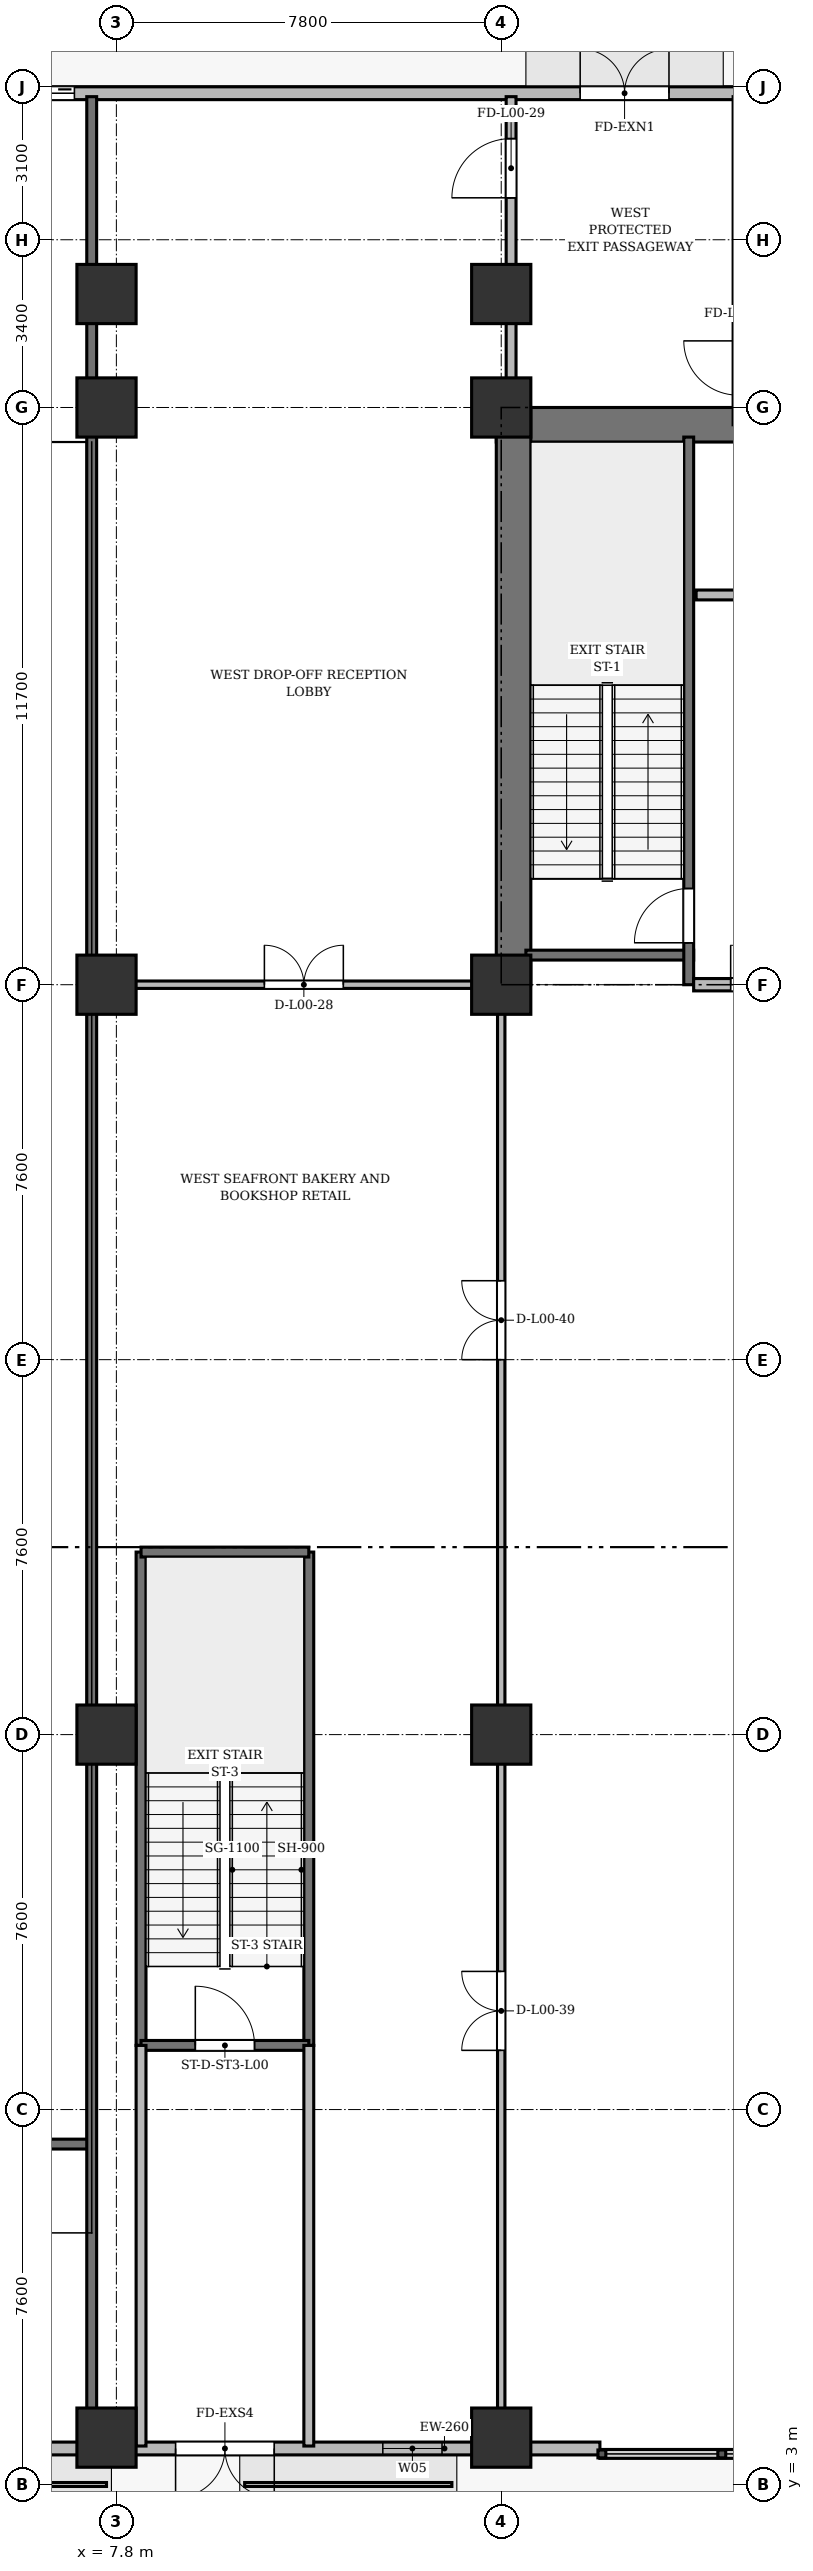
"""IFC4 building model, lengths in metres.
Left out: names, types, materials, properties, quantities, classifications, styles, units other than length and angle.
Written with IfcOpenShell. Run it as: python <this file> out.ifc"""

import sys

from ifc_helpers import new_model, si_unit, direction, frame, frame_2d, origin, origin_2d, place, context, subcontext, project, spatial, rectangle, extrude, source, transform, mapped, element, fill, save


model = new_model("IFC4")
c1 = context("Model", 3, precision=1e-05, world=origin(), true_north=direction((0.0, 1.0)))
c2 = subcontext(c1, "Body", "Model", "MODEL_VIEW")
j1 = project(units=[si_unit("LENGTHUNIT", "METRE"), si_unit("PLANEANGLEUNIT", "RADIAN")], contexts=[c1])
p1 = place(None, origin())
s1 = spatial("IfcSite", under=j1, at=p1, CompositionType="ELEMENT")
p2 = place(p1, origin())
s2 = spatial("IfcBuilding", under=s1, at=p2, CompositionType="ELEMENT")
p3 = place(p2, origin())
s3 = spatial("IfcBuildingStorey", under=s2, at=p3, CompositionType="ELEMENT", Elevation=0.0)
m1 = source(origin(), c2, "Body", "SweptSolid", [
    extrude(rectangle(XDim=1.2, YDim=1.2, at=origin_2d()), origin(), (0.0, 0.0, 1.0), 5.2),
])
for number, where, z_axis, x_axis in (
    (1, (7.6, 3.95, 0.0), (0.0, 0.0, 1.0), (1.0, 0.0, 0.0)),
    (2, (7.6, 18.2, 0.0), (0.0, 0.0, 1.0), (1.0, 0.0, 0.0)),
    (3, (7.6, 33.4, 0.0), (0.0, 0.0, 1.0), (1.0, 0.0, 0.0)),
    (4, (7.6, 45.1, 0.0), (0.0, 0.0, 1.0), (1.0, 0.0, 0.0)),
    (5, (7.6, 47.4, 0.0), (0.0, 0.0, 1.0), (1.0, 0.0, 0.0)),
    (6, (15.6, 3.95, 0.0), (0.0, 0.0, 1.0), (1.0, 0.0, 0.0)),
    (7, (15.6, 18.2, 0.0), (0.0, 0.0, 1.0), (1.0, 0.0, 0.0)),
    (8, (15.6, 33.4, 0.0), (0.0, 0.0, 1.0), (1.0, 0.0, 0.0)),
    (9, (15.6, 45.1, 0.0), (0.0, 0.0, 1.0), (1.0, 0.0, 0.0)),
    (10, (15.6, 47.4, 0.0), (0.0, 0.0, 1.0), (1.0, 0.0, 0.0)),
):
    element("IfcColumn", number, at=place(p3, frame(where, z_axis=z_axis, x_axis=x_axis)), inside=s3, PredefinedType="COLUMN", context=c2, shape_type="MappedRepresentation", body=[
        mapped(m1, transform((0.0, 0.0, 0.0), x_axis=(1.0, 0.0, 0.0), y_axis=(0.0, 1.0, 0.0), z_axis=(0.0, 0.0, 1.0), scale=1.0)),
    ])
p4 = place(p3, frame((-2.05, 51.47, 0.0), z_axis=(0.0, 0.0, 1.0), x_axis=(1.0, 0.0, 0.0)))
e11 = element("IfcWall", 11, at=p4, inside=s3, PredefinedType="SOLIDWALL", context=c2, shape_type="SweptSolid", body=[
    extrude(rectangle(XDim=78.5, YDim=0.26, at=frame_2d((39.25, 0.0))), origin(), (0.0, 0.0, 1.0), 4.88),
])
p5 = place(p4, frame((3.0, 0.0, 0.0)))
e12 = element("IfcOpeningElement", 12, at=p5, cuts=e11, PredefinedType="OPENING", context=c2, shape_type="SweptSolid", body=[
    extrude(rectangle(XDim=6.0, YDim=4.2, at=frame_2d((3.0, 2.1))), frame((0.0, 0.14, 0.0), z_axis=(0.0, -1.0, 0.0), x_axis=(1.0, 0.0, 0.0)), (0.0, 0.0, 1.0), 0.28),
])
p6 = place(p4, frame((19.25, 0.0, 0.0)))
e13 = element("IfcOpeningElement", 13, at=p6, cuts=e11, PredefinedType="OPENING", context=c2, shape_type="SweptSolid", body=[
    extrude(rectangle(XDim=1.8, YDim=2.3, at=frame_2d((0.9, 1.15))), frame((0.0, 0.14, 0.0), z_axis=(0.0, -1.0, 0.0), x_axis=(1.0, 0.0, 0.0)), (0.0, 0.0, 1.0), 0.28),
])
p7 = place(p4, frame((57.85, 0.0, 0.0)))
e14 = element("IfcOpeningElement", 14, at=p7, cuts=e11, PredefinedType="OPENING", context=c2, shape_type="SweptSolid", body=[
    extrude(rectangle(XDim=1.8, YDim=2.3, at=frame_2d((0.9, 1.15))), frame((0.0, 0.14, 0.0), z_axis=(0.0, -1.0, 0.0), x_axis=(1.0, 0.0, 0.0)), (0.0, 0.0, 1.0), 0.28),
])
p8 = place(p3, frame((17.6, 3.73, 0.0), z_axis=(0.0, 0.0, 1.0), x_axis=(-1.0, 0.0, 0.0)))
e15 = element("IfcWall", 15, at=p8, inside=s3, PredefinedType="SOLIDWALL", context=c2, shape_type="SweptSolid", body=[
    extrude(rectangle(XDim=19.65, YDim=0.26, at=frame_2d((9.825, 0.0))), origin(), (0.0, 0.0, 1.0), 3.78),
])
p9 = place(p8, frame((6.6, 0.0, 0.0)))
e16 = element("IfcOpeningElement", 16, at=p9, cuts=e15, PredefinedType="OPENING", context=c2, shape_type="SweptSolid", body=[
    extrude(rectangle(XDim=2.0, YDim=2.4, at=frame_2d((1.0, 1.2))), frame((0.0, 0.14, 0.0), z_axis=(0.0, -1.0, 0.0), x_axis=(1.0, 0.0, 0.0)), (0.0, 0.0, 1.0), 0.28),
])
p10 = place(p8, frame((12.4, 0.0, 0.0)))
e17 = element("IfcOpeningElement", 17, at=p10, cuts=e15, PredefinedType="OPENING", context=c2, shape_type="SweptSolid", body=[
    extrude(rectangle(XDim=2.0, YDim=2.4, at=frame_2d((1.0, 1.2))), frame((0.0, 0.14, 0.0), z_axis=(0.0, -1.0, 0.0), x_axis=(1.0, 0.0, 0.0)), (0.0, 0.0, 1.0), 0.28),
])
p11 = place(p8, frame((3.2, 0.0, 0.9)))
e18 = element("IfcOpeningElement", 18, at=p11, cuts=e15, PredefinedType="OPENING", context=c2, shape_type="SweptSolid", body=[
    extrude(rectangle(XDim=1.2, YDim=2.2, at=frame_2d((0.6, 1.1))), frame((0.0, 0.14, 0.0), z_axis=(0.0, -1.0, 0.0), x_axis=(1.0, 0.0, 0.0)), (0.0, 0.0, 1.0), 0.28),
])
p12 = place(p8, frame((15.2, 0.0, 0.9)))
e19 = element("IfcOpeningElement", 19, at=p12, cuts=e15, PredefinedType="OPENING", context=c2, shape_type="SweptSolid", body=[
    extrude(rectangle(XDim=1.2, YDim=2.2, at=frame_2d((0.6, 1.1))), frame((0.0, 0.14, 0.0), z_axis=(0.0, -1.0, 0.0), x_axis=(1.0, 0.0, 0.0)), (0.0, 0.0, 1.0), 0.28),
])
p13 = place(p3, frame((15.5, 44.75, 0.0), z_axis=(0.0, 0.0, 1.0), x_axis=(1.0, 0.0, 0.0)))
e20 = element("IfcWall", 20, at=p13, inside=s3, PredefinedType="SHEAR", context=c2, shape_type="SweptSolid", body=[
    extrude(rectangle(XDim=43.4, YDim=0.7, at=frame_2d((21.7, 0.0))), origin(), (0.0, 0.0, 1.0), 4.88),
])
p14 = place(p3, frame((15.85, 33.4, 0.0), z_axis=(0.0, 0.0, 1.0), x_axis=(0.0, 1.0, 0.0)))
e21 = element("IfcWall", 21, at=p14, inside=s3, PredefinedType="SHEAR", context=c2, shape_type="SweptSolid", body=[
    extrude(rectangle(XDim=11.7, YDim=0.7, at=frame_2d((5.85, 0.0))), origin(), (0.0, 0.0, 1.0), 4.88),
])
p15 = place(p3, frame((16.1, 34.0, 0.0), z_axis=(0.0, 0.0, 1.0), x_axis=(1.0, 0.0, 0.0)))
e22 = element("IfcWall", 22, at=p15, inside=s3, PredefinedType="SHEAR", context=c2, shape_type="SweptSolid", body=[
    extrude(rectangle(XDim=3.4, YDim=0.2, at=frame_2d((1.7, 0.0))), origin(), (0.0, 0.0, 1.0), 4.88),
])
p16 = place(p3, frame((19.4, 33.4, 0.0), z_axis=(0.0, 0.0, 1.0), x_axis=(0.0, 1.0, 0.0)))
e23 = element("IfcWall", 23, at=p16, inside=s3, PredefinedType="SHEAR", context=c2, shape_type="SweptSolid", body=[
    extrude(rectangle(XDim=11.1, YDim=0.2, at=frame_2d((5.55, 0.0))), origin(), (0.0, 0.0, 1.0), 4.88),
])
p17 = place(p16, frame((0.85, 0.0, 0.0)))
e24 = element("IfcOpeningElement", 24, at=p17, cuts=e23, PredefinedType="OPENING", context=c2, shape_type="SweptSolid", body=[
    extrude(rectangle(XDim=1.1, YDim=2.15, at=frame_2d((0.55, 1.075))), frame((0.0, 0.11, 0.0), z_axis=(0.0, -1.0, 0.0), x_axis=(1.0, 0.0, 0.0)), (0.0, 0.0, 1.0), 0.22),
])
for number, where, z_axis, x_axis in (
    (25, (8.3, 11.9, 0.0), (0.0, 0.0, 1.0), (0.0, 1.0, 0.0)),
    (26, (11.7, 11.9, 0.0), (0.0, 0.0, 1.0), (0.0, 1.0, 0.0)),
):
    element("IfcWall", number, at=place(p3, frame(where, z_axis=z_axis, x_axis=x_axis)), inside=s3, PredefinedType="SHEAR", context=c2, shape_type="SweptSolid", body=[
        extrude(rectangle(XDim=10.0, YDim=0.2, at=frame_2d((5.0, 0.0))), origin(), (0.0, 0.0, 1.0), 4.88),
    ])
p18 = place(p3, frame((8.3, 11.9, 0.0), z_axis=(0.0, 0.0, 1.0), x_axis=(1.0, 0.0, 0.0)))
e27 = element("IfcWall", 27, at=p18, inside=s3, PredefinedType="SHEAR", context=c2, shape_type="SweptSolid", body=[
    extrude(rectangle(XDim=3.4, YDim=0.2, at=frame_2d((1.7, 0.0))), origin(), (0.0, 0.0, 1.0), 4.88),
])
p19 = place(p18, frame((1.1, 0.0, 0.0)))
e28 = element("IfcOpeningElement", 28, at=p19, cuts=e27, PredefinedType="OPENING", context=c2, shape_type="SweptSolid", body=[
    extrude(rectangle(XDim=1.2, YDim=2.15, at=frame_2d((0.6, 1.075))), frame((0.0, 0.11, 0.0), z_axis=(0.0, -1.0, 0.0), x_axis=(1.0, 0.0, 0.0)), (0.0, 0.0, 1.0), 0.22),
])
p20 = place(p3, frame((8.3, 21.9, 0.0), z_axis=(0.0, 0.0, 1.0), x_axis=(1.0, 0.0, 0.0)))
e29 = element("IfcWall", 29, at=p20, inside=s3, PredefinedType="SHEAR", context=c2, shape_type="SweptSolid", body=[
    extrude(rectangle(XDim=3.4, YDim=0.2, at=frame_2d((1.7, 0.0))), origin(), (0.0, 0.0, 1.0), 4.88),
])
p21 = place(p3, frame((19.55, 41.3, 0.0), z_axis=(0.0, 0.0, 1.0), x_axis=(1.0, 0.0, 0.0)))
e30 = element("IfcWall", 30, at=p21, inside=s3, PredefinedType="SOLIDWALL", context=c2, shape_type="SweptSolid", body=[
    extrude(rectangle(XDim=6.75, YDim=0.2, at=frame_2d((3.375, 0.0))), origin(), (0.0, 0.0, 1.0), 4.88),
])
p22 = place(p21, frame((1.7, 0.0, 0.0)))
e31 = element("IfcOpeningElement", 31, at=p22, cuts=e30, PredefinedType="OPENING", context=c2, shape_type="SweptSolid", body=[
    extrude(rectangle(XDim=1.1, YDim=2.15, at=frame_2d((0.55, 1.075))), frame((0.0, 0.11, 0.0), z_axis=(0.0, -1.0, 0.0), x_axis=(1.0, 0.0, 0.0)), (0.0, 0.0, 1.0), 0.22),
])
p23 = place(p21, frame((4.4, 0.0, 0.0)))
e32 = element("IfcOpeningElement", 32, at=p23, cuts=e30, PredefinedType="OPENING", context=c2, shape_type="SweptSolid", body=[
    extrude(rectangle(XDim=1.1, YDim=2.15, at=frame_2d((0.55, 1.075))), frame((0.0, 0.11, 0.0), z_axis=(0.0, -1.0, 0.0), x_axis=(1.0, 0.0, 0.0)), (0.0, 0.0, 1.0), 0.22),
])
p24 = place(p3, frame((19.5, 33.4, 0.0), z_axis=(0.0, 0.0, 1.0), x_axis=(1.0, 0.0, 0.0)))
e33 = element("IfcWall", 33, at=p24, inside=s3, PredefinedType="PARTITIONING", context=c2, shape_type="SweptSolid", body=[
    extrude(rectangle(XDim=6.8, YDim=0.25, at=frame_2d((3.4, 0.0))), origin(), (0.0, 0.0, 1.0), 3.78),
])
p25 = place(p24, frame((0.75, 0.0, 0.0)))
e34 = element("IfcOpeningElement", 34, at=p25, cuts=e33, PredefinedType="OPENING", context=c2, shape_type="SweptSolid", body=[
    extrude(rectangle(XDim=1.6, YDim=2.2, at=frame_2d((0.8, 1.1))), frame((0.0, 0.135, 0.0), z_axis=(0.0, -1.0, 0.0), x_axis=(1.0, 0.0, 0.0)), (0.0, 0.0, 1.0), 0.27),
])
p26 = place(p3, frame((0.7, 9.9, 0.0), z_axis=(0.0, 0.0, 1.0), x_axis=(1.0, 0.0, 0.0)))
e35 = element("IfcWall", 35, at=p26, inside=s3, PredefinedType="SHEAR", context=c2, shape_type="SweptSolid", body=[
    extrude(rectangle(XDim=6.6, YDim=0.2, at=frame_2d((3.3, 0.0))), origin(), (0.0, 0.0, 1.0), 4.88),
])
p27 = place(p3, frame((7.3, 3.8, 0.0), z_axis=(0.0, 0.0, 1.0), x_axis=(0.0, 1.0, 0.0)))
e36 = element("IfcWall", 36, at=p27, inside=s3, PredefinedType="SHEAR", context=c2, shape_type="SweptSolid", body=[
    extrude(rectangle(XDim=47.6, YDim=0.2, at=frame_2d((23.8, 0.0))), origin(), (0.0, 0.0, 1.0), 4.88),
])
p28 = place(p3, frame((7.3, 33.4, 0.0), z_axis=(0.0, 0.0, 1.0), x_axis=(1.0, 0.0, 0.0)))
e37 = element("IfcWall", 37, at=p28, inside=s3, PredefinedType="PARTITIONING", context=c2, shape_type="SweptSolid", body=[
    extrude(rectangle(XDim=8.5, YDim=0.15, at=frame_2d((4.25, 0.0))), origin(), (0.0, 0.0, 1.0), 3.78),
])
p29 = place(p28, frame((3.5, 0.0, 0.0)))
e38 = element("IfcOpeningElement", 38, at=p29, cuts=e37, PredefinedType="OPENING", context=c2, shape_type="SweptSolid", body=[
    extrude(rectangle(XDim=1.6, YDim=2.2, at=frame_2d((0.8, 1.1))), frame((0.0, 0.085, 0.0), z_axis=(0.0, -1.0, 0.0), x_axis=(1.0, 0.0, 0.0)), (0.0, 0.0, 1.0), 0.17),
])
p30 = place(p3, frame((15.8, 44.75, 0.0), z_axis=(0.0, 0.0, 1.0), x_axis=(0.0, 1.0, 0.0)))
e39 = element("IfcWall", 39, at=p30, inside=s3, PredefinedType="PARTITIONING", context=c2, shape_type="SweptSolid", body=[
    extrude(rectangle(XDim=6.65, YDim=0.2, at=frame_2d((3.325, 0.0))), origin(), (0.0, 0.0, 1.0), 3.78),
])
p31 = place(p30, frame((4.6, 0.0, 0.0)))
e40 = element("IfcOpeningElement", 40, at=p31, cuts=e39, PredefinedType="OPENING", context=c2, shape_type="SweptSolid", body=[
    extrude(rectangle(XDim=1.2, YDim=2.15, at=frame_2d((0.6, 1.075))), frame((0.0, 0.11, 0.0), z_axis=(0.0, -1.0, 0.0), x_axis=(1.0, 0.0, 0.0)), (0.0, 0.0, 1.0), 0.22),
])
p32 = place(p3, frame((20.4, 44.75, 0.0), z_axis=(0.0, 0.0, 1.0), x_axis=(0.0, 1.0, 0.0)))
e41 = element("IfcWall", 41, at=p32, inside=s3, PredefinedType="PARTITIONING", context=c2, shape_type="SweptSolid", body=[
    extrude(rectangle(XDim=6.65, YDim=0.2, at=frame_2d((3.325, 0.0))), origin(), (0.0, 0.0, 1.0), 3.78),
])
p33 = place(p32, frame((0.6, 0.0, 0.0)))
e42 = element("IfcOpeningElement", 42, at=p33, cuts=e41, PredefinedType="OPENING", context=c2, shape_type="SweptSolid", body=[
    extrude(rectangle(XDim=1.1, YDim=2.15, at=frame_2d((0.55, 1.075))), frame((0.0, 0.11, 0.0), z_axis=(0.0, -1.0, 0.0), x_axis=(1.0, 0.0, 0.0)), (0.0, 0.0, 1.0), 0.22),
])
for number, where, z_axis, x_axis in (
    (43, (8.3, 3.78, 0.0), (0.0, 0.0, 1.0), (0.0, 1.0, 0.0)),
    (44, (11.7, 3.78, 0.0), (0.0, 0.0, 1.0), (0.0, 1.0, 0.0)),
):
    element("IfcWall", number, at=place(p3, frame(where, z_axis=z_axis, x_axis=x_axis)), inside=s3, PredefinedType="PARTITIONING", context=c2, shape_type="SweptSolid", body=[
        extrude(rectangle(XDim=8.12, YDim=0.2, at=frame_2d((4.06, 0.0))), origin(), (0.0, 0.0, 1.0), 3.78),
    ])
p34 = place(p3, frame((15.6, 3.8, 0.0), z_axis=(0.0, 0.0, 1.0), x_axis=(0.0, 1.0, 0.0)))
e45 = element("IfcWall", 45, at=p34, inside=s3, PredefinedType="PARTITIONING", context=c2, shape_type="SweptSolid", body=[
    extrude(rectangle(XDim=29.6, YDim=0.15, at=frame_2d((14.8, 0.0))), origin(), (0.0, 0.0, 1.0), 4.08),
])
p35 = place(p34, frame((8.0, 0.0, 0.0)))
e46 = element("IfcOpeningElement", 46, at=p35, cuts=e45, PredefinedType="OPENING", context=c2, shape_type="SweptSolid", body=[
    extrude(rectangle(XDim=1.6, YDim=2.2, at=frame_2d((0.8, 1.1))), frame((0.0, 0.085, 0.0), z_axis=(0.0, -1.0, 0.0), x_axis=(1.0, 0.0, 0.0)), (0.0, 0.0, 1.0), 0.17),
])
p36 = place(p34, frame((22.0, 0.0, 0.0)))
e47 = element("IfcOpeningElement", 47, at=p36, cuts=e45, PredefinedType="OPENING", context=c2, shape_type="SweptSolid", body=[
    extrude(rectangle(XDim=1.6, YDim=2.2, at=frame_2d((0.8, 1.1))), frame((0.0, 0.085, 0.0), z_axis=(0.0, -1.0, 0.0), x_axis=(1.0, 0.0, 0.0)), (0.0, 0.0, 1.0), 0.17),
])
m2 = source(origin(), c2, "Body", "SweptSolid", [
    extrude(rectangle(XDim=6.0, YDim=4.2, at=frame_2d((3.0, 2.1))), frame((0.0, 0.025, 0.0), z_axis=(0.0, -1.0, 0.0), x_axis=(1.0, 0.0, 0.0)), (0.0, 0.0, 1.0), 0.05),
])
p37 = place(p5, origin())
e48 = element("IfcDoor", 48, at=p37, inside=s3, OperationType="ROLLINGUP", PredefinedType="GATE", context=c2, shape_type="MappedRepresentation", body=[
    mapped(m2, transform((0.0, 0.0, 0.0), x_axis=(1.0, 0.0, 0.0), y_axis=(0.0, 1.0, 0.0), z_axis=(0.0, 0.0, 1.0), scale=1.0)),
])
fill(e12, e48)
m3 = source(origin(), c2, "Body", "SweptSolid", [
    extrude(rectangle(XDim=1.8, YDim=2.3, at=frame_2d((0.9, 1.15))), frame((0.0, 0.025, 0.0), z_axis=(0.0, -1.0, 0.0), x_axis=(1.0, 0.0, 0.0)), (0.0, 0.0, 1.0), 0.05),
])
p38 = place(p6, origin())
e49 = element("IfcDoor", 49, at=p38, inside=s3, OperationType="DOUBLE_DOOR_SINGLE_SWING", PredefinedType="DOOR", context=c2, shape_type="MappedRepresentation", body=[
    mapped(m3, transform((0.0, 0.0, 0.0), x_axis=(1.0, 0.0, 0.0), y_axis=(0.0, 1.0, 0.0), z_axis=(0.0, 0.0, 1.0), scale=1.0)),
])
fill(e13, e49)
m4 = source(origin(), c2, "Body", "SweptSolid", [
    extrude(rectangle(XDim=2.0, YDim=2.4, at=frame_2d((1.0, 1.2))), frame((0.0, 0.025, 0.0), z_axis=(0.0, -1.0, 0.0), x_axis=(1.0, 0.0, 0.0)), (0.0, 0.0, 1.0), 0.05),
])
p39 = place(p9, origin())
e50 = element("IfcDoor", 50, at=p39, inside=s3, OperationType="DOUBLE_DOOR_SINGLE_SWING", PredefinedType="DOOR", context=c2, shape_type="MappedRepresentation", body=[
    mapped(m4, transform((0.0, 0.0, 0.0), x_axis=(1.0, 0.0, 0.0), y_axis=(0.0, 1.0, 0.0), z_axis=(0.0, 0.0, 1.0), scale=1.0)),
])
fill(e16, e50)
m5 = source(origin(), c2, "Body", "SweptSolid", [
    extrude(rectangle(XDim=1.2, YDim=2.2, at=frame_2d((0.6, 1.1))), frame((0.0, 0.03, 0.0), z_axis=(0.0, -1.0, 0.0), x_axis=(1.0, 0.0, 0.0)), (0.0, 0.0, 1.0), 0.06),
])
p40 = place(p11, origin())
e51 = element("IfcWindow", 51, at=p40, inside=s3, PartitioningType="SINGLE_PANEL", PredefinedType="WINDOW", context=c2, shape_type="MappedRepresentation", body=[
    mapped(m5, transform((0.0, 0.0, 0.0), x_axis=(1.0, 0.0, 0.0), y_axis=(0.0, 1.0, 0.0), z_axis=(0.0, 0.0, 1.0), scale=1.0)),
])
fill(e18, e51)
m6 = source(origin(), c2, "Body", "SweptSolid", [
    extrude(rectangle(XDim=1.1, YDim=2.15, at=frame_2d((0.55, 1.075))), frame((0.0, 0.025, 0.0), z_axis=(0.0, -1.0, 0.0), x_axis=(1.0, 0.0, 0.0)), (0.0, 0.0, 1.0), 0.05),
])
p41 = place(p17, origin())
e52 = element("IfcDoor", 52, at=p41, inside=s3, OperationType="SINGLE_SWING_LEFT", PredefinedType="DOOR", context=c2, shape_type="MappedRepresentation", body=[
    mapped(m6, transform((0.0, 0.0, 0.0), x_axis=(1.0, 0.0, 0.0), y_axis=(0.0, 1.0, 0.0), z_axis=(0.0, 0.0, 1.0), scale=1.0)),
])
fill(e24, e52)
m7 = source(origin(), c2, "Body", "SweptSolid", [
    extrude(rectangle(XDim=1.2, YDim=2.15, at=frame_2d((0.6, 1.075))), frame((0.0, 0.025, 0.0), z_axis=(0.0, -1.0, 0.0), x_axis=(1.0, 0.0, 0.0)), (0.0, 0.0, 1.0), 0.05),
])
p42 = place(p19, origin())
e53 = element("IfcDoor", 53, at=p42, inside=s3, OperationType="SINGLE_SWING_LEFT", PredefinedType="DOOR", context=c2, shape_type="MappedRepresentation", body=[
    mapped(m7, transform((0.0, 0.0, 0.0), x_axis=(1.0, 0.0, 0.0), y_axis=(0.0, 1.0, 0.0), z_axis=(0.0, 0.0, 1.0), scale=1.0)),
])
fill(e28, e53)
m8 = source(origin(), c2, "Body", "SweptSolid", [
    extrude(rectangle(XDim=1.6, YDim=2.2, at=frame_2d((0.8, 1.1))), frame((0.0, 0.025, 0.0), z_axis=(0.0, -1.0, 0.0), x_axis=(1.0, 0.0, 0.0)), (0.0, 0.0, 1.0), 0.05),
])
p43 = place(p25, origin())
e54 = element("IfcDoor", 54, at=p43, inside=s3, OperationType="DOUBLE_DOOR_SINGLE_SWING", PredefinedType="DOOR", context=c2, shape_type="MappedRepresentation", body=[
    mapped(m8, transform((0.0, 0.0, 0.0), x_axis=(1.0, 0.0, 0.0), y_axis=(0.0, 1.0, 0.0), z_axis=(0.0, 0.0, 1.0), scale=1.0)),
])
fill(e34, e54)
p44 = place(p29, origin())
e55 = element("IfcDoor", 55, at=p44, inside=s3, OperationType="DOUBLE_DOOR_SINGLE_SWING", PredefinedType="DOOR", context=c2, shape_type="MappedRepresentation", body=[
    mapped(m8, transform((0.0, 0.0, 0.0), x_axis=(1.0, 0.0, 0.0), y_axis=(0.0, 1.0, 0.0), z_axis=(0.0, 0.0, 1.0), scale=1.0)),
])
fill(e38, e55)
p45 = place(p31, origin())
e56 = element("IfcDoor", 56, at=p45, inside=s3, OperationType="SINGLE_SWING_LEFT", PredefinedType="DOOR", context=c2, shape_type="MappedRepresentation", body=[
    mapped(m7, transform((0.0, 0.0, 0.0), x_axis=(1.0, 0.0, 0.0), y_axis=(0.0, 1.0, 0.0), z_axis=(0.0, 0.0, 1.0), scale=1.0)),
])
fill(e40, e56)
p46 = place(p35, origin())
e57 = element("IfcDoor", 57, at=p46, inside=s3, OperationType="DOUBLE_DOOR_SINGLE_SWING", PredefinedType="DOOR", context=c2, shape_type="MappedRepresentation", body=[
    mapped(m8, transform((0.0, 0.0, 0.0), x_axis=(1.0, 0.0, 0.0), y_axis=(0.0, 1.0, 0.0), z_axis=(0.0, 0.0, 1.0), scale=1.0)),
])
fill(e46, e57)
p47 = place(p36, origin())
e58 = element("IfcDoor", 58, at=p47, inside=s3, OperationType="DOUBLE_DOOR_SINGLE_SWING", PredefinedType="DOOR", context=c2, shape_type="MappedRepresentation", body=[
    mapped(m8, transform((0.0, 0.0, 0.0), x_axis=(1.0, 0.0, 0.0), y_axis=(0.0, 1.0, 0.0), z_axis=(0.0, 0.0, 1.0), scale=1.0)),
])
fill(e47, e58)
save(model, sys.argv[1])
